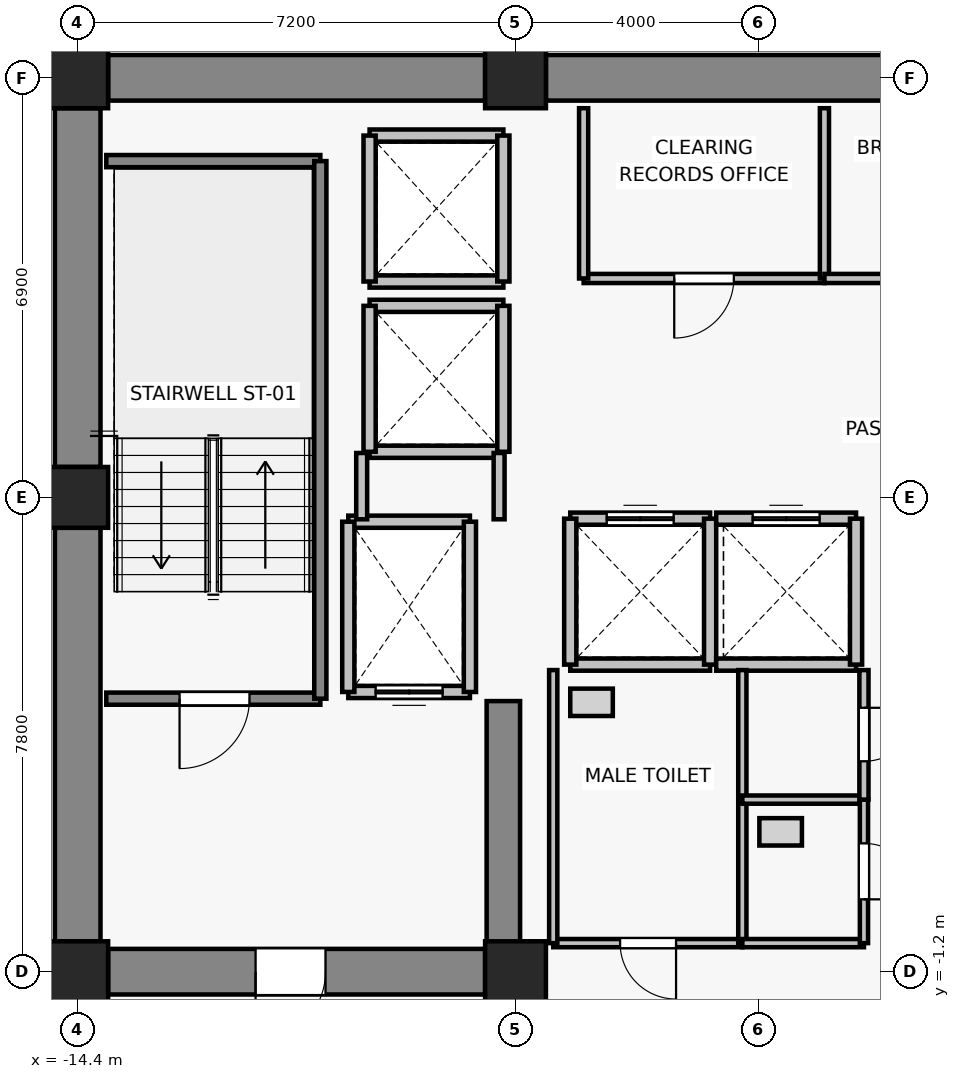
"""IFC4 building model, lengths in metres.
Left out: names, types, materials, properties, quantities, classifications, styles, units other than length and angle.
Written with IfcOpenShell. Run it as: python <this file> out.ifc"""

import sys

from ifc_helpers import new_model, si_unit, direction, frame, frame_2d, origin, origin_2d, place, context, subcontext, project, spatial, rectangle, extrude, source, transform, mapped, element, fill, save


model = new_model("IFC4")
c1 = context("Model", 3, precision=1e-05, world=origin(), true_north=direction((0.0, 1.0)))
c2 = subcontext(c1, "Body", "Model", "MODEL_VIEW")
j1 = project(units=[si_unit("LENGTHUNIT", "METRE"), si_unit("PLANEANGLEUNIT", "RADIAN")], contexts=[c1])
p1 = place(None, origin())
s1 = spatial("IfcSite", under=j1, at=p1, CompositionType="ELEMENT")
p2 = place(p1, origin())
s2 = spatial("IfcBuilding", under=s1, at=p2, CompositionType="ELEMENT")
p3 = place(p2, frame((0.0, 0.0, 172.6)))
s3 = spatial("IfcBuildingStorey", under=s2, at=p3, CompositionType="ELEMENT", Elevation=172.6)
for number, where, z_axis, x_axis in (
    (1, (-14.4, -1.2, 0.0), (0.0, 0.0, 1.0), (1.0, 0.0, 0.0)),
    (2, (-7.2, -1.2, 0.0), (0.0, 0.0, 1.0), (1.0, 0.0, 0.0)),
    (3, (-14.4, 6.6, 0.0), (0.0, 0.0, 1.0), (1.0, 0.0, 0.0)),
    (4, (-14.4, 13.5, 0.0), (0.0, 0.0, 1.0), (1.0, 0.0, 0.0)),
    (5, (-7.2, 13.5, 0.0), (0.0, 0.0, 1.0), (1.0, 0.0, 0.0)),
):
    element("IfcColumn", number, at=place(p3, frame(where, z_axis=z_axis, x_axis=x_axis)), inside=s3, PredefinedType="COLUMN", context=c2, shape_type="SweptSolid", body=[
        extrude(rectangle(XDim=1.0, YDim=1.0, at=origin_2d()), origin(), (0.0, 0.0, 1.0), 3.3),
    ])
p4 = place(p3, frame((-13.9, 13.5, 0.0), z_axis=(0.0, 0.0, 1.0), x_axis=(1.0, 0.0, 0.0)))
e6 = element("IfcWall", 6, at=p4, inside=s3, PredefinedType="SHEAR", context=c2, shape_type="SweptSolid", body=[
    extrude(rectangle(XDim=6.2, YDim=0.75, at=frame_2d((3.1, 0.0))), origin(), (0.0, 0.0, 1.0), 3.075),
])
p5 = place(p3, frame((-6.7, 13.5, 0.0), z_axis=(0.0, 0.0, 1.0), x_axis=(1.0, 0.0, 0.0)))
e7 = element("IfcWall", 7, at=p5, inside=s3, PredefinedType="SHEAR", context=c2, shape_type="SweptSolid", body=[
    extrude(rectangle(XDim=13.4, YDim=0.75, at=frame_2d((6.7, 0.0))), origin(), (0.0, 0.0, 1.0), 3.075),
])
p6 = place(p3, frame((-14.4, -0.7, 0.0), z_axis=(0.0, 0.0, 1.0), x_axis=(0.0, 1.0, 0.0)))
e8 = element("IfcWall", 8, at=p6, inside=s3, PredefinedType="SHEAR", context=c2, shape_type="SweptSolid", body=[
    extrude(rectangle(XDim=6.8, YDim=0.75, at=frame_2d((3.4, 0.0))), origin(), (0.0, 0.0, 1.0), 3.075),
])
p7 = place(p3, frame((-14.4, 7.1, 0.0), z_axis=(0.0, 0.0, 1.0), x_axis=(0.0, 1.0, 0.0)))
e9 = element("IfcWall", 9, at=p7, inside=s3, PredefinedType="SHEAR", context=c2, shape_type="SweptSolid", body=[
    extrude(rectangle(XDim=5.9, YDim=0.75, at=frame_2d((2.95, 0.0))), origin(), (0.0, 0.0, 1.0), 3.075),
])
p8 = place(p3, frame((-7.7, -1.2, 0.0), z_axis=(0.0, 0.0, 1.0), x_axis=(-1.0, 0.0, 0.0)))
e10 = element("IfcWall", 10, at=p8, inside=s3, PredefinedType="SHEAR", context=c2, shape_type="SweptSolid", body=[
    extrude(rectangle(XDim=6.2, YDim=0.75, at=frame_2d((3.1, 0.0))), origin(), (0.0, 0.0, 1.0), 3.075),
])
p9 = place(p8, frame((2.625, 0.0, 0.0)))
e11 = element("IfcOpeningElement", 11, at=p9, cuts=e10, PredefinedType="OPENING", context=c2, shape_type="SweptSolid", body=[
    extrude(rectangle(XDim=1.15, YDim=2.15, at=frame_2d((0.575, 1.075))), frame((0.0, 0.385, 0.0), z_axis=(0.0, -1.0, 0.0), x_axis=(1.0, 0.0, 0.0)), (0.0, 0.0, 1.0), 0.77),
])
p10 = place(p3, frame((-7.4, -0.825, 0.0), z_axis=(0.0, 0.0, 1.0), x_axis=(0.0, 1.0, 0.0)))
e12 = element("IfcWall", 12, at=p10, inside=s3, PredefinedType="SHEAR", context=c2, shape_type="SweptSolid", body=[
    extrude(rectangle(XDim=4.075, YDim=0.55, at=frame_2d((2.038, 0.0))), origin(), (0.0, 0.0, 1.0), 3.075),
])
p11 = place(p3, frame((-7.95, 3.4, 0.0), z_axis=(0.0, 0.0, 1.0), x_axis=(-1.0, 0.0, 0.0)))
e13 = element("IfcWall", 13, at=p11, inside=s3, PredefinedType="SOLIDWALL", context=c2, shape_type="SweptSolid", body=[
    extrude(rectangle(XDim=2.0, YDim=0.2, at=frame_2d((1.0, 0.0))), origin(), (0.0, 0.0, 1.0), 3.075),
])
p12 = place(p11, frame((0.45, 0.0, 0.0)))
e14 = element("IfcOpeningElement", 14, at=p12, cuts=e13, PredefinedType="OPENING", context=c2, shape_type="SweptSolid", body=[
    extrude(rectangle(XDim=1.1, YDim=2.2, at=frame_2d((0.55, 1.1))), frame((0.0, 0.11, 0.0), z_axis=(0.0, -1.0, 0.0), x_axis=(1.0, 0.0, 0.0)), (0.0, 0.0, 1.0), 0.22),
])
p13 = place(p3, frame((-9.95, 6.2, 0.0), z_axis=(0.0, 0.0, 1.0), x_axis=(1.0, 0.0, 0.0)))
e15 = element("IfcWall", 15, at=p13, inside=s3, PredefinedType="SOLIDWALL", context=c2, shape_type="SweptSolid", body=[
    extrude(rectangle(XDim=2.0, YDim=0.2, at=frame_2d((1.0, 0.0))), origin(), (0.0, 0.0, 1.0), 3.075),
])
for number, where, z_axis, x_axis in (
    (16, (-9.95, 3.4, 0.0), (0.0, 0.0, 1.0), (0.0, 1.0, 0.0)),
    (17, (-7.95, 6.2, 0.0), (0.0, 0.0, 1.0), (0.0, -1.0, 0.0)),
):
    element("IfcWall", number, at=place(p3, frame(where, z_axis=z_axis, x_axis=x_axis)), inside=s3, PredefinedType="SOLIDWALL", context=c2, shape_type="SweptSolid", body=[
        extrude(rectangle(XDim=2.8, YDim=0.2, at=frame_2d((1.4, 0.0))), origin(), (0.0, 0.0, 1.0), 3.075),
    ])
p14 = place(p3, frame((-4.0, 3.85, 0.0), z_axis=(0.0, 0.0, 1.0), x_axis=(-1.0, 0.0, 0.0)))
e18 = element("IfcWall", 18, at=p14, inside=s3, PredefinedType="SOLIDWALL", context=c2, shape_type="SweptSolid", body=[
    extrude(rectangle(XDim=2.3, YDim=0.2, at=frame_2d((1.15, 0.0))), origin(), (0.0, 0.0, 1.0), 3.075),
])
p15 = place(p3, frame((-6.3, 6.25, 0.0), z_axis=(0.0, 0.0, 1.0), x_axis=(1.0, 0.0, 0.0)))
e19 = element("IfcWall", 19, at=p15, inside=s3, PredefinedType="SOLIDWALL", context=c2, shape_type="SweptSolid", body=[
    extrude(rectangle(XDim=2.3, YDim=0.2, at=frame_2d((1.15, 0.0))), origin(), (0.0, 0.0, 1.0), 3.075),
])
p16 = place(p15, frame((0.6, 0.0, 0.0)))
e20 = element("IfcOpeningElement", 20, at=p16, cuts=e19, PredefinedType="OPENING", context=c2, shape_type="SweptSolid", body=[
    extrude(rectangle(XDim=1.1, YDim=2.2, at=frame_2d((0.55, 1.1))), frame((0.0, 0.11, 0.0), z_axis=(0.0, -1.0, 0.0), x_axis=(1.0, 0.0, 0.0)), (0.0, 0.0, 1.0), 0.22),
])
for number, where, z_axis, x_axis in (
    (21, (-6.3, 3.85, 0.0), (0.0, 0.0, 1.0), (0.0, 1.0, 0.0)),
    (22, (-4.0, 6.25, 0.0), (0.0, 0.0, 1.0), (0.0, -1.0, 0.0)),
):
    element("IfcWall", number, at=place(p3, frame(where, z_axis=z_axis, x_axis=x_axis)), inside=s3, PredefinedType="SOLIDWALL", context=c2, shape_type="SweptSolid", body=[
        extrude(rectangle(XDim=2.4, YDim=0.2, at=frame_2d((1.2, 0.0))), origin(), (0.0, 0.0, 1.0), 3.075),
    ])
p17 = place(p3, frame((-1.6, 3.85, 0.0), z_axis=(0.0, 0.0, 1.0), x_axis=(-1.0, 0.0, 0.0)))
e23 = element("IfcWall", 23, at=p17, inside=s3, PredefinedType="SOLIDWALL", context=c2, shape_type="SweptSolid", body=[
    extrude(rectangle(XDim=2.3, YDim=0.2, at=frame_2d((1.15, 0.0))), origin(), (0.0, 0.0, 1.0), 3.075),
])
p18 = place(p3, frame((-3.9, 6.25, 0.0), z_axis=(0.0, 0.0, 1.0), x_axis=(1.0, 0.0, 0.0)))
e24 = element("IfcWall", 24, at=p18, inside=s3, PredefinedType="SOLIDWALL", context=c2, shape_type="SweptSolid", body=[
    extrude(rectangle(XDim=2.3, YDim=0.2, at=frame_2d((1.15, 0.0))), origin(), (0.0, 0.0, 1.0), 3.075),
])
p19 = place(p18, frame((0.6, 0.0, 0.0)))
e25 = element("IfcOpeningElement", 25, at=p19, cuts=e24, PredefinedType="OPENING", context=c2, shape_type="SweptSolid", body=[
    extrude(rectangle(XDim=1.1, YDim=2.2, at=frame_2d((0.55, 1.1))), frame((0.0, 0.11, 0.0), z_axis=(0.0, -1.0, 0.0), x_axis=(1.0, 0.0, 0.0)), (0.0, 0.0, 1.0), 0.22),
])
p20 = place(p3, frame((-1.6, 6.25, 0.0), z_axis=(0.0, 0.0, 1.0), x_axis=(0.0, -1.0, 0.0)))
e26 = element("IfcWall", 26, at=p20, inside=s3, PredefinedType="SOLIDWALL", context=c2, shape_type="SweptSolid", body=[
    extrude(rectangle(XDim=2.4, YDim=0.2, at=frame_2d((1.2, 0.0))), origin(), (0.0, 0.0, 1.0), 3.075),
])
for number, where, z_axis, x_axis in (
    (27, (-7.4, 7.35, 0.0), (0.0, 0.0, 1.0), (-1.0, 0.0, 0.0)),
    (28, (-9.6, 9.75, 0.0), (0.0, 0.0, 1.0), (1.0, 0.0, 0.0)),
):
    element("IfcWall", number, at=place(p3, frame(where, z_axis=z_axis, x_axis=x_axis)), inside=s3, PredefinedType="SOLIDWALL", context=c2, shape_type="SweptSolid", body=[
        extrude(rectangle(XDim=2.2, YDim=0.2, at=frame_2d((1.1, 0.0))), origin(), (0.0, 0.0, 1.0), 2.565),
    ])
p21 = place(p3, frame((-9.6, 7.35, 0.0), z_axis=(0.0, 0.0, 1.0), x_axis=(0.0, 1.0, 0.0)))
e29 = element("IfcWall", 29, at=p21, inside=s3, PredefinedType="SOLIDWALL", context=c2, shape_type="SweptSolid", body=[
    extrude(rectangle(XDim=2.4, YDim=0.2, at=frame_2d((1.2, 0.0))), origin(), (0.0, 0.0, 1.0), 3.075),
])
p22 = place(p3, frame((-7.4, 9.75, 0.0), z_axis=(0.0, 0.0, 1.0), x_axis=(0.0, -1.0, 0.0)))
e30 = element("IfcWall", 30, at=p22, inside=s3, PredefinedType="SOLIDWALL", context=c2, shape_type="SweptSolid", body=[
    extrude(rectangle(XDim=2.4, YDim=0.2, at=frame_2d((1.2, 0.0))), origin(), (0.0, 0.0, 1.0), 2.565),
])
for number, where, z_axis, x_axis in (
    (31, (-7.4, 10.15, 0.0), (0.0, 0.0, 1.0), (-1.0, 0.0, 0.0)),
    (32, (-9.6, 12.55, 0.0), (0.0, 0.0, 1.0), (1.0, 0.0, 0.0)),
):
    element("IfcWall", number, at=place(p3, frame(where, z_axis=z_axis, x_axis=x_axis)), inside=s3, PredefinedType="SOLIDWALL", context=c2, shape_type="SweptSolid", body=[
        extrude(rectangle(XDim=2.2, YDim=0.2, at=frame_2d((1.1, 0.0))), origin(), (0.0, 0.0, 1.0), 2.565),
    ])
p23 = place(p3, frame((-9.6, 10.15, 0.0), z_axis=(0.0, 0.0, 1.0), x_axis=(0.0, 1.0, 0.0)))
e33 = element("IfcWall", 33, at=p23, inside=s3, PredefinedType="SOLIDWALL", context=c2, shape_type="SweptSolid", body=[
    extrude(rectangle(XDim=2.4, YDim=0.2, at=frame_2d((1.2, 0.0))), origin(), (0.0, 0.0, 1.0), 3.075),
])
p24 = place(p3, frame((-7.4, 12.55, 0.0), z_axis=(0.0, 0.0, 1.0), x_axis=(0.0, -1.0, 0.0)))
e34 = element("IfcWall", 34, at=p24, inside=s3, PredefinedType="SOLIDWALL", context=c2, shape_type="SweptSolid", body=[
    extrude(rectangle(XDim=2.4, YDim=0.2, at=frame_2d((1.2, 0.0))), origin(), (0.0, 0.0, 1.0), 2.565),
])
p25 = place(p3, frame((-10.41, 3.29, 0.0), z_axis=(0.0, 0.0, 1.0), x_axis=(-1.0, 0.0, 0.0)))
e35 = element("IfcWall", 35, at=p25, inside=s3, PredefinedType="SOLIDWALL", context=c2, shape_type="SweptSolid", body=[
    extrude(rectangle(XDim=3.52, YDim=0.2, at=frame_2d((1.76, 0.0))), origin(), (0.0, 0.0, 1.0), 3.075),
])
p26 = place(p25, frame((1.165, 0.0, 0.0)))
e36 = element("IfcOpeningElement", 36, at=p26, cuts=e35, PredefinedType="OPENING", context=c2, shape_type="SweptSolid", body=[
    extrude(rectangle(XDim=1.15, YDim=2.15, at=frame_2d((0.575, 1.075))), frame((0.0, 0.11, 0.0), z_axis=(0.0, -1.0, 0.0), x_axis=(1.0, 0.0, 0.0)), (0.0, 0.0, 1.0), 0.22),
])
p27 = place(p3, frame((-13.93, 12.13, 0.0), z_axis=(0.0, 0.0, 1.0), x_axis=(1.0, 0.0, 0.0)))
e37 = element("IfcWall", 37, at=p27, inside=s3, PredefinedType="SOLIDWALL", context=c2, shape_type="SweptSolid", body=[
    extrude(rectangle(XDim=3.52, YDim=0.2, at=frame_2d((1.76, 0.0))), origin(), (0.0, 0.0, 1.0), 3.075),
])
p28 = place(p3, frame((-10.41, 12.13, 0.0), z_axis=(0.0, 0.0, 1.0), x_axis=(0.0, -1.0, 0.0)))
e38 = element("IfcWall", 38, at=p28, inside=s3, PredefinedType="SOLIDWALL", context=c2, shape_type="SweptSolid", body=[
    extrude(rectangle(XDim=8.84, YDim=0.2, at=frame_2d((4.42, 0.0))), origin(), (0.0, 0.0, 1.0), 3.075),
])
p29 = place(p3, frame((-9.73, 6.24, 0.0), z_axis=(0.0, 0.0, 1.0), x_axis=(0.0, 1.0, 0.0)))
e39 = element("IfcWall", 39, at=p29, inside=s3, PredefinedType="PARTITIONING", context=c2, shape_type="SweptSolid", body=[
    extrude(rectangle(XDim=1.09, YDim=0.18, at=frame_2d((0.545, 0.0))), origin(), (0.0, 0.0, 1.0), 3.075),
])
p30 = place(p3, frame((-7.47, 7.33, 0.0), z_axis=(0.0, 0.0, 1.0), x_axis=(0.0, -1.0, 0.0)))
e40 = element("IfcWall", 40, at=p30, inside=s3, PredefinedType="PARTITIONING", context=c2, shape_type="SweptSolid", body=[
    extrude(rectangle(XDim=1.09, YDim=0.18, at=frame_2d((0.545, 0.0))), origin(), (0.0, 0.0, 1.0), 2.565),
])
p31 = place(p3, frame((-2.12, 10.2, 0.0), z_axis=(0.0, 0.0, 1.0), x_axis=(-1.0, 0.0, 0.0)))
e41 = element("IfcWall", 41, at=p31, inside=s3, PredefinedType="PARTITIONING", context=c2, shape_type="SweptSolid", body=[
    extrude(rectangle(XDim=3.96, YDim=0.15, at=frame_2d((1.98, 0.0))), origin(), (0.0, 0.0, 1.0), 3.075),
])
p32 = place(p31, frame((1.49, 0.0, 0.0)))
e42 = element("IfcOpeningElement", 42, at=p32, cuts=e41, PredefinedType="OPENING", context=c2, shape_type="SweptSolid", body=[
    extrude(rectangle(XDim=0.98, YDim=2.15, at=frame_2d((0.49, 1.075))), frame((0.0, 0.085, 0.0), z_axis=(0.0, -1.0, 0.0), x_axis=(1.0, 0.0, 0.0)), (0.0, 0.0, 1.0), 0.17),
])
for number, where, z_axis, x_axis in (
    (43, (-6.08, 10.2, 0.0), (0.0, 0.0, 1.0), (0.0, 1.0, 0.0)),
    (44, (-2.12, 13.0, 0.0), (0.0, 0.0, 1.0), (0.0, -1.0, 0.0)),
):
    element("IfcWall", number, at=place(p3, frame(where, z_axis=z_axis, x_axis=x_axis)), inside=s3, PredefinedType="PARTITIONING", context=c2, shape_type="SweptSolid", body=[
        extrude(rectangle(XDim=2.8, YDim=0.15, at=frame_2d((1.4, 0.0))), origin(), (0.0, 0.0, 1.0), 3.075),
    ])
p33 = place(p3, frame((2.04, 10.2, 0.0), z_axis=(0.0, 0.0, 1.0), x_axis=(-1.0, 0.0, 0.0)))
e45 = element("IfcWall", 45, at=p33, inside=s3, PredefinedType="PARTITIONING", context=c2, shape_type="SweptSolid", body=[
    extrude(rectangle(XDim=4.16, YDim=0.15, at=frame_2d((2.08, 0.0))), origin(), (0.0, 0.0, 1.0), 3.075),
])
p34 = place(p33, frame((1.55, 0.0, 0.0)))
e46 = element("IfcOpeningElement", 46, at=p34, cuts=e45, PredefinedType="OPENING", context=c2, shape_type="SweptSolid", body=[
    extrude(rectangle(XDim=0.98, YDim=2.15, at=frame_2d((0.49, 1.075))), frame((0.0, 0.085, 0.0), z_axis=(0.0, -1.0, 0.0), x_axis=(1.0, 0.0, 0.0)), (0.0, 0.0, 1.0), 0.17),
])
p35 = place(p3, frame((-3.47, -0.73, 0.0), z_axis=(0.0, 0.0, 1.0), x_axis=(-1.0, 0.0, 0.0)))
e47 = element("IfcWall", 47, at=p35, inside=s3, PredefinedType="PARTITIONING", context=c2, shape_type="SweptSolid", body=[
    extrude(rectangle(XDim=3.11, YDim=0.135, at=frame_2d((1.555, 0.0))), origin(), (0.0, 0.0, 1.0), 3.075),
])
p36 = place(p35, frame((1.09, 0.0, 0.0)))
e48 = element("IfcOpeningElement", 48, at=p36, cuts=e47, PredefinedType="OPENING", context=c2, shape_type="SweptSolid", body=[
    extrude(rectangle(XDim=0.92, YDim=2.1, at=frame_2d((0.46, 1.05))), frame((0.0, 0.077, 0.0), z_axis=(0.0, -1.0, 0.0), x_axis=(1.0, 0.0, 0.0)), (0.0, 0.0, 1.0), 0.155),
])
for number, where, z_axis, x_axis in (
    (49, (-6.58, -0.73, 0.0), (0.0, 0.0, 1.0), (0.0, 1.0, 0.0)),
    (50, (-3.47, 3.76, 0.0), (0.0, 0.0, 1.0), (0.0, -1.0, 0.0)),
):
    element("IfcWall", number, at=place(p3, frame(where, z_axis=z_axis, x_axis=x_axis)), inside=s3, PredefinedType="PARTITIONING", context=c2, shape_type="SweptSolid", body=[
        extrude(rectangle(XDim=4.49, YDim=0.135, at=frame_2d((2.245, 0.0))), origin(), (0.0, 0.0, 1.0), 3.075),
    ])
for number, where, z_axis, x_axis in (
    (51, (-1.47, -0.73, 0.0), (0.0, 0.0, 1.0), (-1.0, 0.0, 0.0)),
    (52, (-3.47, 1.63, 0.0), (0.0, 0.0, 1.0), (1.0, 0.0, 0.0)),
):
    element("IfcWall", number, at=place(p3, frame(where, z_axis=z_axis, x_axis=x_axis)), inside=s3, PredefinedType="PARTITIONING", context=c2, shape_type="SweptSolid", body=[
        extrude(rectangle(XDim=2.0, YDim=0.135, at=frame_2d((1.0, 0.0))), origin(), (0.0, 0.0, 1.0), 3.075),
    ])
p37 = place(p3, frame((-1.47, 1.63, 0.0), z_axis=(0.0, 0.0, 1.0), x_axis=(0.0, -1.0, 0.0)))
e53 = element("IfcWall", 53, at=p37, inside=s3, PredefinedType="PARTITIONING", context=c2, shape_type="SweptSolid", body=[
    extrude(rectangle(XDim=2.36, YDim=0.135, at=frame_2d((1.18, 0.0))), origin(), (0.0, 0.0, 1.0), 3.075),
])
p38 = place(p37, frame((0.72, 0.0, 0.0)))
e54 = element("IfcOpeningElement", 54, at=p38, cuts=e53, PredefinedType="OPENING", context=c2, shape_type="SweptSolid", body=[
    extrude(rectangle(XDim=0.92, YDim=2.1, at=frame_2d((0.46, 1.05))), frame((0.0, 0.077, 0.0), z_axis=(0.0, -1.0, 0.0), x_axis=(1.0, 0.0, 0.0)), (0.0, 0.0, 1.0), 0.155),
])
p39 = place(p3, frame((-1.47, 3.76, 0.0), z_axis=(0.0, 0.0, 1.0), x_axis=(0.0, -1.0, 0.0)))
e55 = element("IfcWall", 55, at=p39, inside=s3, PredefinedType="PARTITIONING", context=c2, shape_type="SweptSolid", body=[
    extrude(rectangle(XDim=2.13, YDim=0.15, at=frame_2d((1.065, 0.0))), origin(), (0.0, 0.0, 1.0), 3.075),
])
p40 = place(p39, frame((0.62, 0.0, 0.0)))
e56 = element("IfcOpeningElement", 56, at=p40, cuts=e55, PredefinedType="OPENING", context=c2, shape_type="SweptSolid", body=[
    extrude(rectangle(XDim=0.88, YDim=2.1, at=frame_2d((0.44, 1.05))), frame((0.0, 0.085, 0.0), z_axis=(0.0, -1.0, 0.0), x_axis=(1.0, 0.0, 0.0)), (0.0, 0.0, 1.0), 0.17),
])
m1 = source(origin(), c2, "Body", "SweptSolid", [
    extrude(rectangle(XDim=1.1, YDim=2.2, at=frame_2d((0.55, 1.1))), frame((0.0, 0.025, 0.0), z_axis=(0.0, -1.0, 0.0), x_axis=(1.0, 0.0, 0.0)), (0.0, 0.0, 1.0), 0.05),
])
p41 = place(p12, origin())
e57 = element("IfcDoor", 57, at=p41, inside=s3, OperationType="DOUBLE_DOOR_SLIDING", PredefinedType="DOOR", context=c2, shape_type="MappedRepresentation", body=[
    mapped(m1, transform((0.0, 0.0, 0.0), x_axis=(1.0, 0.0, 0.0), y_axis=(0.0, 1.0, 0.0), z_axis=(0.0, 0.0, 1.0), scale=1.0)),
])
fill(e14, e57)
p42 = place(p16, origin())
e58 = element("IfcDoor", 58, at=p42, inside=s3, OperationType="DOUBLE_DOOR_SLIDING", PredefinedType="DOOR", context=c2, shape_type="MappedRepresentation", body=[
    mapped(m1, transform((0.0, 0.0, 0.0), x_axis=(1.0, 0.0, 0.0), y_axis=(0.0, 1.0, 0.0), z_axis=(0.0, 0.0, 1.0), scale=1.0)),
])
fill(e20, e58)
p43 = place(p19, origin())
e59 = element("IfcDoor", 59, at=p43, inside=s3, OperationType="DOUBLE_DOOR_SLIDING", PredefinedType="DOOR", context=c2, shape_type="MappedRepresentation", body=[
    mapped(m1, transform((0.0, 0.0, 0.0), x_axis=(1.0, 0.0, 0.0), y_axis=(0.0, 1.0, 0.0), z_axis=(0.0, 0.0, 1.0), scale=1.0)),
])
fill(e25, e59)
m2 = source(origin(), c2, "Body", "SweptSolid", [
    extrude(rectangle(XDim=1.15, YDim=2.15, at=frame_2d((0.575, 1.075))), frame((0.0, 0.025, 0.0), z_axis=(0.0, -1.0, 0.0), x_axis=(1.0, 0.0, 0.0)), (0.0, 0.0, 1.0), 0.05),
])
p44 = place(p26, origin())
e60 = element("IfcDoor", 60, at=p44, inside=s3, OperationType="SINGLE_SWING_RIGHT", PredefinedType="DOOR", context=c2, shape_type="MappedRepresentation", body=[
    mapped(m2, transform((0.0, 0.0, 0.0), x_axis=(1.0, 0.0, 0.0), y_axis=(0.0, 1.0, 0.0), z_axis=(0.0, 0.0, 1.0), scale=1.0)),
])
fill(e36, e60)
p45 = place(p9, origin())
e61 = element("IfcDoor", 61, at=p45, inside=s3, OperationType="SINGLE_SWING_RIGHT", PredefinedType="DOOR", context=c2, shape_type="MappedRepresentation", body=[
    mapped(m2, transform((0.0, 0.0, 0.0), x_axis=(1.0, 0.0, 0.0), y_axis=(0.0, 1.0, 0.0), z_axis=(0.0, 0.0, 1.0), scale=1.0)),
])
fill(e11, e61)
m3 = source(origin(), c2, "Body", "SweptSolid", [
    extrude(rectangle(XDim=0.98, YDim=2.15, at=frame_2d((0.49, 1.075))), frame((0.0, 0.025, 0.0), z_axis=(0.0, -1.0, 0.0), x_axis=(1.0, 0.0, 0.0)), (0.0, 0.0, 1.0), 0.05),
])
p46 = place(p32, origin())
e62 = element("IfcDoor", 62, at=p46, inside=s3, OperationType="SINGLE_SWING_RIGHT", PredefinedType="DOOR", context=c2, shape_type="MappedRepresentation", body=[
    mapped(m3, transform((0.0, 0.0, 0.0), x_axis=(1.0, 0.0, 0.0), y_axis=(0.0, 1.0, 0.0), z_axis=(0.0, 0.0, 1.0), scale=1.0)),
])
fill(e42, e62)
m4 = source(origin(), c2, "Body", "SweptSolid", [
    extrude(rectangle(XDim=0.92, YDim=2.1, at=frame_2d((0.46, 1.05))), frame((0.0, 0.025, 0.0), z_axis=(0.0, -1.0, 0.0), x_axis=(1.0, 0.0, 0.0)), (0.0, 0.0, 1.0), 0.05),
])
p47 = place(p36, origin())
e63 = element("IfcDoor", 63, at=p47, inside=s3, OperationType="SINGLE_SWING_LEFT", PredefinedType="DOOR", context=c2, shape_type="MappedRepresentation", body=[
    mapped(m4, transform((0.0, 0.0, 0.0), x_axis=(1.0, 0.0, 0.0), y_axis=(0.0, 1.0, 0.0), z_axis=(0.0, 0.0, 1.0), scale=1.0)),
])
fill(e48, e63)
p48 = place(p38, origin())
e64 = element("IfcDoor", 64, at=p48, inside=s3, OperationType="SINGLE_SWING_RIGHT", PredefinedType="DOOR", context=c2, shape_type="MappedRepresentation", body=[
    mapped(m4, transform((0.0, 0.0, 0.0), x_axis=(1.0, 0.0, 0.0), y_axis=(0.0, 1.0, 0.0), z_axis=(0.0, 0.0, 1.0), scale=1.0)),
])
fill(e54, e64)
m5 = source(origin(), c2, "Body", "SweptSolid", [
    extrude(rectangle(XDim=0.88, YDim=2.1, at=frame_2d((0.44, 1.05))), frame((0.0, 0.025, 0.0), z_axis=(0.0, -1.0, 0.0), x_axis=(1.0, 0.0, 0.0)), (0.0, 0.0, 1.0), 0.05),
])
p49 = place(p40, origin())
e65 = element("IfcDoor", 65, at=p49, inside=s3, OperationType="SINGLE_SWING_LEFT", PredefinedType="DOOR", context=c2, shape_type="MappedRepresentation", body=[
    mapped(m5, transform((0.0, 0.0, 0.0), x_axis=(1.0, 0.0, 0.0), y_axis=(0.0, 1.0, 0.0), z_axis=(0.0, 0.0, 1.0), scale=1.0)),
])
fill(e56, e65)
save(model, sys.argv[1])
